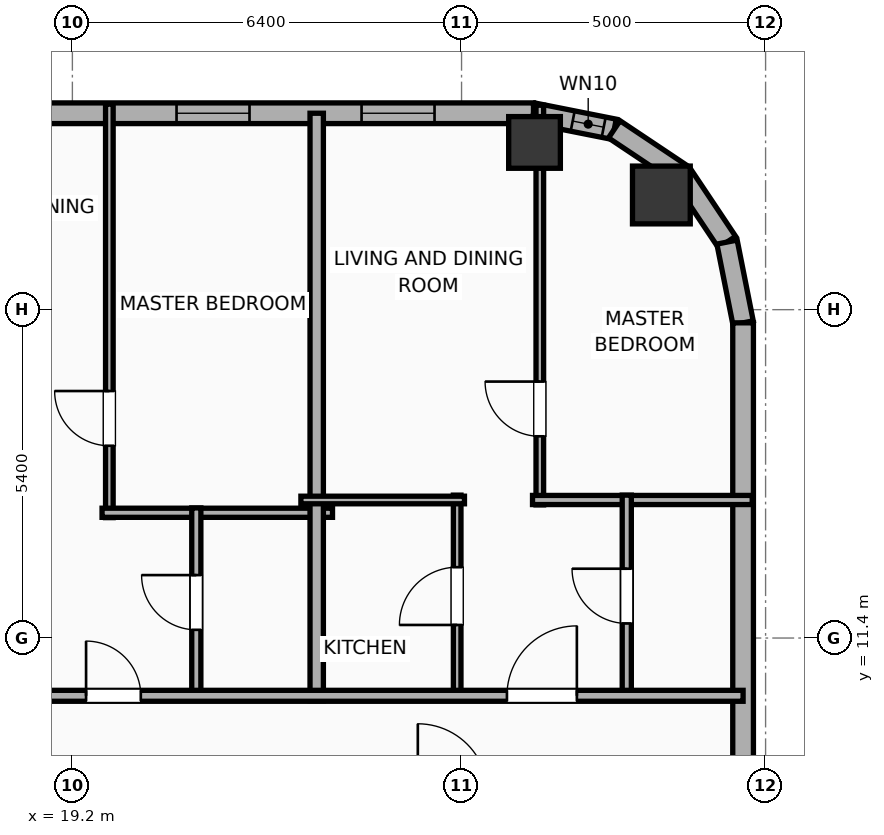
"""IFC4 building model, lengths in metres.
Left out: names, types, materials, properties, quantities, classifications, styles, units other than length and angle.
Written with IfcOpenShell. Run it as: python <this file> out.ifc"""

import sys

from ifc_helpers import new_model, si_unit, direction, frame, frame_2d, origin, origin_2d, place, context, subcontext, project, spatial, rectangle, hollow_rectangle, hollow_circle, extrude, element, fill, save


model = new_model("IFC4")
c1 = context("Model", 3, precision=1e-05, world=origin(), true_north=direction((0.0, 1.0)))
c2 = subcontext(c1, "Body", "Model", "MODEL_VIEW")
j1 = project(units=[si_unit("LENGTHUNIT", "METRE"), si_unit("PLANEANGLEUNIT", "RADIAN")], contexts=[c1])
p1 = place(None, origin())
s1 = spatial("IfcSite", under=j1, at=p1, CompositionType="ELEMENT")
p2 = place(p1, origin())
s2 = spatial("IfcBuilding", under=s1, at=p2, CompositionType="ELEMENT")
p3 = place(p2, frame((0.0, 0.0, 239.2)))
s3 = spatial("IfcBuildingStorey", under=s2, at=p3, CompositionType="ELEMENT", Elevation=239.2)
p4 = place(p3, frame((28.886, 18.686, 0.0), z_axis=(0.0, 0.0, 1.0), x_axis=(1.0, 0.0, 0.0)))
e1 = element("IfcColumn", 1, at=p4, inside=s3, PredefinedType="COLUMN", context=c2, shape_type="SweptSolid", body=[
    extrude(hollow_circle(Radius=0.475, WallThickness=0.032, at=origin_2d()), origin(), (0.0, 0.0, 1.0), 3.9),
])
p5 = place(p3, frame((26.8, 19.55, 0.0), z_axis=(0.0, 0.0, 1.0), x_axis=(1.0, 0.0, 0.0)))
e2 = element("IfcColumn", 2, at=p5, inside=s3, PredefinedType="COLUMN", context=c2, shape_type="SweptSolid", body=[
    extrude(hollow_rectangle(XDim=0.85, YDim=0.85, WallThickness=0.028, at=origin_2d()), origin(), (0.0, 0.0, 1.0), 3.9),
])
p6 = place(p3, frame((-22.783, 20.03, 0.0), z_axis=(0.0, 0.0, 1.0), x_axis=(1.0, 0.0, 0.0)))
e3 = element("IfcWall", 3, at=p6, inside=s3, PredefinedType="ELEMENTEDWALL", context=c2, shape_type="SweptSolid", body=[
    extrude(rectangle(XDim=49.566, YDim=0.34, at=frame_2d((24.783, 0.0))), origin(), (0.0, 0.0, 1.0), 3.65),
])
p7 = place(p6, frame((6.211, 0.0, 0.75)))
e4 = element("IfcOpeningElement", 4, at=p7, cuts=e3, PredefinedType="OPENING", context=c2, shape_type="SweptSolid", body=[
    extrude(rectangle(XDim=2.4, YDim=2.1, at=frame_2d((1.2, 1.05))), frame((0.0, 0.18, 0.0), z_axis=(0.0, -1.0, 0.0), x_axis=(1.0, 0.0, 0.0)), (0.0, 0.0, 1.0), 0.36),
])
p8 = place(p6, frame((22.733, 0.0, 0.75)))
e5 = element("IfcOpeningElement", 5, at=p8, cuts=e3, PredefinedType="OPENING", context=c2, shape_type="SweptSolid", body=[
    extrude(rectangle(XDim=2.4, YDim=2.1, at=frame_2d((1.2, 1.05))), frame((0.0, 0.18, 0.0), z_axis=(0.0, -1.0, 0.0), x_axis=(1.0, 0.0, 0.0)), (0.0, 0.0, 1.0), 0.36),
])
p9 = place(p6, frame((1.132, 0.0, 0.75)))
e6 = element("IfcOpeningElement", 6, at=p9, cuts=e3, PredefinedType="OPENING", context=c2, shape_type="SweptSolid", body=[
    extrude(rectangle(XDim=1.2, YDim=2.05, at=frame_2d((0.6, 1.025))), frame((0.0, 0.18, 0.0), z_axis=(0.0, -1.0, 0.0), x_axis=(1.0, 0.0, 0.0)), (0.0, 0.0, 1.0), 0.36),
])
p10 = place(p6, frame((3.678, 0.0, 0.75)))
e7 = element("IfcOpeningElement", 7, at=p10, cuts=e3, PredefinedType="OPENING", context=c2, shape_type="SweptSolid", body=[
    extrude(rectangle(XDim=1.2, YDim=2.05, at=frame_2d((0.6, 1.025))), frame((0.0, 0.18, 0.0), z_axis=(0.0, -1.0, 0.0), x_axis=(1.0, 0.0, 0.0)), (0.0, 0.0, 1.0), 0.36),
])
p11 = place(p6, frame((14.804, 0.0, 0.75)))
e8 = element("IfcOpeningElement", 8, at=p11, cuts=e3, PredefinedType="OPENING", context=c2, shape_type="SweptSolid", body=[
    extrude(rectangle(XDim=1.2, YDim=2.05, at=frame_2d((0.6, 1.025))), frame((0.0, 0.18, 0.0), z_axis=(0.0, -1.0, 0.0), x_axis=(1.0, 0.0, 0.0)), (0.0, 0.0, 1.0), 0.36),
])
p12 = place(p6, frame((12.054, 0.0, 0.75)))
e9 = element("IfcOpeningElement", 9, at=p12, cuts=e3, PredefinedType="OPENING", context=c2, shape_type="SweptSolid", body=[
    extrude(rectangle(XDim=1.2, YDim=2.05, at=frame_2d((0.6, 1.025))), frame((0.0, 0.18, 0.0), z_axis=(0.0, -1.0, 0.0), x_axis=(1.0, 0.0, 0.0)), (0.0, 0.0, 1.0), 0.36),
])
p13 = place(p6, frame((17.933, 0.0, 0.75)))
e10 = element("IfcOpeningElement", 10, at=p13, cuts=e3, PredefinedType="OPENING", context=c2, shape_type="SweptSolid", body=[
    extrude(rectangle(XDim=1.2, YDim=2.05, at=frame_2d((0.6, 1.025))), frame((0.0, 0.18, 0.0), z_axis=(0.0, -1.0, 0.0), x_axis=(1.0, 0.0, 0.0)), (0.0, 0.0, 1.0), 0.36),
])
p14 = place(p6, frame((26.278, 0.0, 0.75)))
e11 = element("IfcOpeningElement", 11, at=p14, cuts=e3, PredefinedType="OPENING", context=c2, shape_type="SweptSolid", body=[
    extrude(rectangle(XDim=1.2, YDim=2.05, at=frame_2d((0.6, 1.025))), frame((0.0, 0.18, 0.0), z_axis=(0.0, -1.0, 0.0), x_axis=(1.0, 0.0, 0.0)), (0.0, 0.0, 1.0), 0.36),
])
p15 = place(p6, frame((32.677, 0.0, 0.75)))
e12 = element("IfcOpeningElement", 12, at=p15, cuts=e3, PredefinedType="OPENING", context=c2, shape_type="SweptSolid", body=[
    extrude(rectangle(XDim=1.2, YDim=2.05, at=frame_2d((0.6, 1.025))), frame((0.0, 0.18, 0.0), z_axis=(0.0, -1.0, 0.0), x_axis=(1.0, 0.0, 0.0)), (0.0, 0.0, 1.0), 0.36),
])
p16 = place(p6, frame((28.217, 0.0, 0.75)))
e13 = element("IfcOpeningElement", 13, at=p16, cuts=e3, PredefinedType="OPENING", context=c2, shape_type="SweptSolid", body=[
    extrude(rectangle(XDim=0.85, YDim=2.05, at=frame_2d((0.425, 1.025))), frame((0.0, 0.18, 0.0), z_axis=(0.0, -1.0, 0.0), x_axis=(1.0, 0.0, 0.0)), (0.0, 0.0, 1.0), 0.36),
])
p17 = place(p6, frame((36.678, 0.0, 0.75)))
e14 = element("IfcOpeningElement", 14, at=p17, cuts=e3, PredefinedType="OPENING", context=c2, shape_type="SweptSolid", body=[
    extrude(rectangle(XDim=1.2, YDim=2.05, at=frame_2d((0.6, 1.025))), frame((0.0, 0.18, 0.0), z_axis=(0.0, -1.0, 0.0), x_axis=(1.0, 0.0, 0.0)), (0.0, 0.0, 1.0), 0.36),
])
p18 = place(p6, frame((40.307, 0.0, 0.75)))
e15 = element("IfcOpeningElement", 15, at=p18, cuts=e3, PredefinedType="OPENING", context=c2, shape_type="SweptSolid", body=[
    extrude(rectangle(XDim=1.2, YDim=2.05, at=frame_2d((0.6, 1.025))), frame((0.0, 0.18, 0.0), z_axis=(0.0, -1.0, 0.0), x_axis=(1.0, 0.0, 0.0)), (0.0, 0.0, 1.0), 0.36),
])
p19 = place(p6, frame((43.696, 0.0, 0.75)))
e16 = element("IfcOpeningElement", 16, at=p19, cuts=e3, PredefinedType="OPENING", context=c2, shape_type="SweptSolid", body=[
    extrude(rectangle(XDim=1.2, YDim=2.05, at=frame_2d((0.6, 1.025))), frame((0.0, 0.18, 0.0), z_axis=(0.0, -1.0, 0.0), x_axis=(1.0, 0.0, 0.0)), (0.0, 0.0, 1.0), 0.36),
])
p20 = place(p6, frame((46.739, 0.0, 0.75)))
e17 = element("IfcOpeningElement", 17, at=p20, cuts=e3, PredefinedType="OPENING", context=c2, shape_type="SweptSolid", body=[
    extrude(rectangle(XDim=1.2, YDim=2.05, at=frame_2d((0.6, 1.025))), frame((0.0, 0.18, 0.0), z_axis=(0.0, -1.0, 0.0), x_axis=(1.0, 0.0, 0.0)), (0.0, 0.0, 1.0), 0.36),
])
p21 = place(p3, frame((26.783, 20.03, 0.0), z_axis=(0.0, 0.0, 1.0), x_axis=(0.980788153188, -0.195075878998, 0.0)))
e18 = element("IfcWall", 18, at=p21, inside=s3, PredefinedType="ELEMENTEDWALL", context=c2, shape_type="SweptSolid", body=[
    extrude(rectangle(XDim=1.354, YDim=0.34, at=frame_2d((0.677, 0.0))), origin(), (0.0, 0.0, 1.0), 3.65),
])
p22 = place(p21, frame((0.657, 0.0, 0.75)))
e19 = element("IfcOpeningElement", 19, at=p22, cuts=e18, PredefinedType="OPENING", context=c2, shape_type="SweptSolid", body=[
    extrude(rectangle(XDim=0.52, YDim=2.05, at=frame_2d((0.26, 1.025))), frame((0.0, 0.18, 0.0), z_axis=(0.0, -1.0, 0.0), x_axis=(1.0, 0.0, 0.0)), (0.0, 0.0, 1.0), 0.36),
])
for number, where, z_axis, x_axis in (
    (20, (28.111, 19.766, 0.0), (0.0, 0.0, 1.0), (0.831, -0.556, 0.0)),
    (21, (29.223, 19.023, 0.0), (0.0, 0.0, 1.0), (0.556, -0.831, 0.0)),
):
    element("IfcWall", number, at=place(p3, frame(where, z_axis=z_axis, x_axis=x_axis)), inside=s3, PredefinedType="ELEMENTEDWALL", context=c2, shape_type="SweptSolid", body=[
        extrude(rectangle(XDim=1.337, YDim=0.34, at=frame_2d((0.668, 0.0))), origin(), (0.0, 0.0, 1.0), 3.65),
    ])
p23 = place(p3, frame((29.966, 17.911, 0.0), z_axis=(0.0, 0.0, 1.0), x_axis=(0.195075878998, -0.980788153188, 0.0)))
e22 = element("IfcWall", 22, at=p23, inside=s3, PredefinedType="ELEMENTEDWALL", context=c2, shape_type="SweptSolid", body=[
    extrude(rectangle(XDim=1.354, YDim=0.34, at=frame_2d((0.677, 0.0))), origin(), (0.0, 0.0, 1.0), 3.65),
])
p24 = place(p3, frame((30.23, 16.583, 0.0), z_axis=(0.0, 0.0, 1.0), x_axis=(0.0, -1.0, 0.0)))
e23 = element("IfcWall", 23, at=p24, inside=s3, PredefinedType="ELEMENTEDWALL", context=c2, shape_type="SweptSolid", body=[
    extrude(rectangle(XDim=31.967, YDim=0.34, at=frame_2d((15.983, 0.0))), origin(), (0.0, 0.0, 1.0), 3.65),
])
p25 = place(p24, frame((29.924, 0.0, 0.75)))
e24 = element("IfcOpeningElement", 24, at=p25, cuts=e23, PredefinedType="OPENING", context=c2, shape_type="SweptSolid", body=[
    extrude(rectangle(XDim=1.2, YDim=2.05, at=frame_2d((0.6, 1.025))), frame((0.0, 0.18, 0.0), z_axis=(0.0, -1.0, 0.0), x_axis=(1.0, 0.0, 0.0)), (0.0, 0.0, 1.0), 0.36),
])
p26 = place(p24, frame((11.463, 0.0, 0.75)))
e25 = element("IfcOpeningElement", 25, at=p26, cuts=e23, PredefinedType="OPENING", context=c2, shape_type="SweptSolid", body=[
    extrude(rectangle(XDim=1.2, YDim=2.05, at=frame_2d((0.6, 1.025))), frame((0.0, 0.18, 0.0), z_axis=(0.0, -1.0, 0.0), x_axis=(1.0, 0.0, 0.0)), (0.0, 0.0, 1.0), 0.36),
])
p27 = place(p24, frame((20.363, 0.0, 0.75)))
e26 = element("IfcOpeningElement", 26, at=p27, cuts=e23, PredefinedType="OPENING", context=c2, shape_type="SweptSolid", body=[
    extrude(rectangle(XDim=1.2, YDim=2.05, at=frame_2d((0.6, 1.025))), frame((0.0, 0.18, 0.0), z_axis=(0.0, -1.0, 0.0), x_axis=(1.0, 0.0, 0.0)), (0.0, 0.0, 1.0), 0.36),
])
p28 = place(p3, frame((19.808, 13.38, 0.0), z_axis=(0.0, 0.0, 1.0), x_axis=(0.0, 1.0, 0.0)))
e27 = element("IfcWall", 27, at=p28, inside=s3, PredefinedType="PARTITIONING", context=c2, shape_type="SweptSolid", body=[
    extrude(rectangle(XDim=6.8, YDim=0.125, at=frame_2d((3.4, 0.0))), origin(), (0.0, 0.0, 1.0), 3.65),
])
p29 = place(p28, frame((1.182, 0.0, 0.0)))
e28 = element("IfcOpeningElement", 28, at=p29, cuts=e27, PredefinedType="OPENING", context=c2, shape_type="SweptSolid", body=[
    extrude(rectangle(XDim=0.9, YDim=2.05, at=frame_2d((0.45, 1.025))), frame((0.0, 0.073, 0.0), z_axis=(0.0, -1.0, 0.0), x_axis=(1.0, 0.0, 0.0)), (0.0, 0.0, 1.0), 0.145),
])
p30 = place(p3, frame((19.688, 13.46, 0.0), z_axis=(0.0, 0.0, 1.0), x_axis=(1.0, 0.0, 0.0)))
e29 = element("IfcWall", 29, at=p30, inside=s3, PredefinedType="PLUMBINGWALL", context=c2, shape_type="SweptSolid", body=[
    extrude(rectangle(XDim=3.79, YDim=0.15, at=frame_2d((1.895, 0.0))), origin(), (0.0, 0.0, 1.0), 3.65),
])
p31 = place(p3, frame((21.238, 10.43, 0.0), z_axis=(0.0, 0.0, 1.0), x_axis=(0.0, 1.0, 0.0)))
e30 = element("IfcWall", 30, at=p31, inside=s3, PredefinedType="PLUMBINGWALL", context=c2, shape_type="SweptSolid", body=[
    extrude(rectangle(XDim=3.11, YDim=0.15, at=frame_2d((1.555, 0.0))), origin(), (0.0, 0.0, 1.0), 3.65),
])
p32 = place(p31, frame((1.105, 0.0, 0.0)))
e31 = element("IfcOpeningElement", 31, at=p32, cuts=e30, PredefinedType="OPENING", context=c2, shape_type="SweptSolid", body=[
    extrude(rectangle(XDim=0.9, YDim=2.05, at=frame_2d((0.45, 1.025))), frame((0.0, 0.085, 0.0), z_axis=(0.0, -1.0, 0.0), x_axis=(1.0, 0.0, 0.0)), (0.0, 0.0, 1.0), 0.17),
])
p33 = place(p3, frame((23.218, 10.37, 0.0), z_axis=(0.0, 0.0, 1.0), x_axis=(0.0, 1.0, 0.0)))
e32 = element("IfcWall", 32, at=p33, inside=s3, PredefinedType="PARTITIONING", context=c2, shape_type="SweptSolid", body=[
    extrude(rectangle(XDim=9.66, YDim=0.22, at=frame_2d((4.83, 0.0))), origin(), (0.0, 0.0, 1.0), 3.65),
])
p34 = place(p3, frame((26.887, 13.59, 0.0), z_axis=(0.0, 0.0, 1.0), x_axis=(0.0, 1.0, 0.0)))
e33 = element("IfcWall", 33, at=p34, inside=s3, PredefinedType="PARTITIONING", context=c2, shape_type="SweptSolid", body=[
    extrude(rectangle(XDim=6.572, YDim=0.125, at=frame_2d((3.286, 0.0))), origin(), (0.0, 0.0, 1.0), 3.65),
])
p35 = place(p34, frame((1.127, 0.0, 0.0)))
e34 = element("IfcOpeningElement", 34, at=p35, cuts=e33, PredefinedType="OPENING", context=c2, shape_type="SweptSolid", body=[
    extrude(rectangle(XDim=0.9, YDim=2.05, at=frame_2d((0.45, 1.025))), frame((0.0, 0.073, 0.0), z_axis=(0.0, -1.0, 0.0), x_axis=(1.0, 0.0, 0.0)), (0.0, 0.0, 1.0), 0.145),
])
p36 = place(p3, frame((26.767, 13.67, 0.0), z_axis=(0.0, 0.0, 1.0), x_axis=(1.0, 0.0, 0.0)))
e35 = element("IfcWall", 35, at=p36, inside=s3, PredefinedType="PLUMBINGWALL", context=c2, shape_type="SweptSolid", body=[
    extrude(rectangle(XDim=3.613, YDim=0.15, at=frame_2d((1.806, 0.0))), origin(), (0.0, 0.0, 1.0), 3.65),
])
p37 = place(p3, frame((25.528, 10.43, 0.0), z_axis=(0.0, 0.0, 1.0), x_axis=(0.0, 1.0, 0.0)))
e36 = element("IfcWall", 36, at=p37, inside=s3, PredefinedType="PARTITIONING", context=c2, shape_type="SweptSolid", body=[
    extrude(rectangle(XDim=3.32, YDim=0.125, at=frame_2d((1.66, 0.0))), origin(), (0.0, 0.0, 1.0), 3.65),
])
p38 = place(p37, frame((1.185, 0.0, 0.0)))
e37 = element("IfcOpeningElement", 37, at=p38, cuts=e36, PredefinedType="OPENING", context=c2, shape_type="SweptSolid", body=[
    extrude(rectangle(XDim=0.95, YDim=2.05, at=frame_2d((0.475, 1.025))), frame((0.0, 0.073, 0.0), z_axis=(0.0, -1.0, 0.0), x_axis=(1.0, 0.0, 0.0)), (0.0, 0.0, 1.0), 0.145),
])
p39 = place(p3, frame((22.958, 13.67, 0.0), z_axis=(0.0, 0.0, 1.0), x_axis=(1.0, 0.0, 0.0)))
e38 = element("IfcWall", 38, at=p39, inside=s3, PredefinedType="PARTITIONING", context=c2, shape_type="SweptSolid", body=[
    extrude(rectangle(XDim=2.69, YDim=0.125, at=frame_2d((1.345, 0.0))), origin(), (0.0, 0.0, 1.0), 3.65),
])
p40 = place(p3, frame((28.317, 10.43, 0.0), z_axis=(0.0, 0.0, 1.0), x_axis=(0.0, 1.0, 0.0)))
e39 = element("IfcWall", 39, at=p40, inside=s3, PredefinedType="PLUMBINGWALL", context=c2, shape_type="SweptSolid", body=[
    extrude(rectangle(XDim=3.32, YDim=0.15, at=frame_2d((1.66, 0.0))), origin(), (0.0, 0.0, 1.0), 3.65),
])
p41 = place(p40, frame((1.21, 0.0, 0.0)))
e40 = element("IfcOpeningElement", 40, at=p41, cuts=e39, PredefinedType="OPENING", context=c2, shape_type="SweptSolid", body=[
    extrude(rectangle(XDim=0.9, YDim=2.05, at=frame_2d((0.45, 1.025))), frame((0.0, 0.085, 0.0), z_axis=(0.0, -1.0, 0.0), x_axis=(1.0, 0.0, 0.0)), (0.0, 0.0, 1.0), 0.17),
])
p42 = place(p3, frame((-26.23, 10.45, 0.0), z_axis=(0.0, 0.0, 1.0), x_axis=(1.0, 0.0, 0.0)))
e41 = element("IfcWall", 41, at=p42, inside=s3, PredefinedType="PARTITIONING", context=c2, shape_type="SweptSolid", body=[
    extrude(rectangle(XDim=56.46, YDim=0.18, at=frame_2d((28.23, 0.0))), origin(), (0.0, 0.0, 1.0), 3.65),
])
p43 = place(p42, frame((4.41, 0.0, 0.0)))
e42 = element("IfcOpeningElement", 42, at=p43, cuts=e41, PredefinedType="OPENING", context=c2, shape_type="SweptSolid", body=[
    extrude(rectangle(XDim=1.15, YDim=2.05, at=frame_2d((0.575, 1.025))), frame((0.0, 0.1, 0.0), z_axis=(0.0, -1.0, 0.0), x_axis=(1.0, 0.0, 0.0)), (0.0, 0.0, 1.0), 0.2),
])
p44 = place(p42, frame((11.943, 0.0, 0.0)))
e43 = element("IfcOpeningElement", 43, at=p44, cuts=e41, PredefinedType="OPENING", context=c2, shape_type="SweptSolid", body=[
    extrude(rectangle(XDim=0.9, YDim=2.05, at=frame_2d((0.45, 1.025))), frame((0.0, 0.1, 0.0), z_axis=(0.0, -1.0, 0.0), x_axis=(1.0, 0.0, 0.0)), (0.0, 0.0, 1.0), 0.2),
])
p45 = place(p42, frame((18.243, 0.0, 0.0)))
e44 = element("IfcOpeningElement", 44, at=p45, cuts=e41, PredefinedType="OPENING", context=c2, shape_type="SweptSolid", body=[
    extrude(rectangle(XDim=1.15, YDim=2.05, at=frame_2d((0.575, 1.025))), frame((0.0, 0.1, 0.0), z_axis=(0.0, -1.0, 0.0), x_axis=(1.0, 0.0, 0.0)), (0.0, 0.0, 1.0), 0.2),
])
p46 = place(p42, frame((22.941, 0.0, 0.0)))
e45 = element("IfcOpeningElement", 45, at=p46, cuts=e41, PredefinedType="OPENING", context=c2, shape_type="SweptSolid", body=[
    extrude(rectangle(XDim=0.9, YDim=2.05, at=frame_2d((0.45, 1.025))), frame((0.0, 0.1, 0.0), z_axis=(0.0, -1.0, 0.0), x_axis=(1.0, 0.0, 0.0)), (0.0, 0.0, 1.0), 0.2),
])
p47 = place(p42, frame((27.028, 0.0, 0.0)))
e46 = element("IfcOpeningElement", 46, at=p47, cuts=e41, PredefinedType="OPENING", context=c2, shape_type="SweptSolid", body=[
    extrude(rectangle(XDim=1.15, YDim=2.05, at=frame_2d((0.575, 1.025))), frame((0.0, 0.1, 0.0), z_axis=(0.0, -1.0, 0.0), x_axis=(1.0, 0.0, 0.0)), (0.0, 0.0, 1.0), 0.2),
])
p48 = place(p42, frame((36.864, 0.0, 0.0)))
e47 = element("IfcOpeningElement", 47, at=p48, cuts=e41, PredefinedType="OPENING", context=c2, shape_type="SweptSolid", body=[
    extrude(rectangle(XDim=1.15, YDim=2.05, at=frame_2d((0.575, 1.025))), frame((0.0, 0.1, 0.0), z_axis=(0.0, -1.0, 0.0), x_axis=(1.0, 0.0, 0.0)), (0.0, 0.0, 1.0), 0.2),
])
p49 = place(p42, frame((45.655, 0.0, 0.0)))
e48 = element("IfcOpeningElement", 48, at=p49, cuts=e41, PredefinedType="OPENING", context=c2, shape_type="SweptSolid", body=[
    extrude(rectangle(XDim=0.9, YDim=2.05, at=frame_2d((0.45, 1.025))), frame((0.0, 0.1, 0.0), z_axis=(0.0, -1.0, 0.0), x_axis=(1.0, 0.0, 0.0)), (0.0, 0.0, 1.0), 0.2),
])
p50 = place(p42, frame((52.576, 0.0, 0.0)))
e49 = element("IfcOpeningElement", 49, at=p50, cuts=e41, PredefinedType="OPENING", context=c2, shape_type="SweptSolid", body=[
    extrude(rectangle(XDim=1.15, YDim=2.05, at=frame_2d((0.575, 1.025))), frame((0.0, 0.1, 0.0), z_axis=(0.0, -1.0, 0.0), x_axis=(1.0, 0.0, 0.0)), (0.0, 0.0, 1.0), 0.2),
])
p51 = place(p19, origin())
e50 = element("IfcWindow", 50, at=p51, inside=s3, PartitioningType="SINGLE_PANEL", PredefinedType="WINDOW", context=c2, shape_type="SweptSolid", body=[
    extrude(rectangle(XDim=1.2, YDim=2.05, at=frame_2d((0.6, 1.025))), frame((0.0, 0.03, 0.0), z_axis=(0.0, -1.0, 0.0), x_axis=(1.0, 0.0, 0.0)), (0.0, 0.0, 1.0), 0.06),
])
fill(e16, e50)
p52 = place(p20, origin())
e51 = element("IfcWindow", 51, at=p52, inside=s3, PartitioningType="SINGLE_PANEL", PredefinedType="WINDOW", context=c2, shape_type="SweptSolid", body=[
    extrude(rectangle(XDim=1.2, YDim=2.05, at=frame_2d((0.6, 1.025))), frame((0.0, 0.03, 0.0), z_axis=(0.0, -1.0, 0.0), x_axis=(1.0, 0.0, 0.0)), (0.0, 0.0, 1.0), 0.06),
])
fill(e17, e51)
p53 = place(p22, origin())
e52 = element("IfcWindow", 52, at=p53, inside=s3, PartitioningType="SINGLE_PANEL", PredefinedType="WINDOW", context=c2, shape_type="SweptSolid", body=[
    extrude(rectangle(XDim=0.52, YDim=2.05, at=frame_2d((0.26, 1.025))), frame((0.0, 0.03, 0.0), z_axis=(0.0, -1.0, 0.0), x_axis=(1.0, 0.0, 0.0)), (0.0, 0.0, 1.0), 0.06),
])
fill(e19, e52)
p54 = place(p29, origin())
e53 = element("IfcDoor", 53, at=p54, inside=s3, OperationType="SINGLE_SWING_RIGHT", PredefinedType="DOOR", context=c2, shape_type="SweptSolid", body=[
    extrude(rectangle(XDim=0.9, YDim=2.05, at=frame_2d((0.45, 1.025))), frame((0.0, 0.025, 0.0), z_axis=(0.0, -1.0, 0.0), x_axis=(1.0, 0.0, 0.0)), (0.0, 0.0, 1.0), 0.05),
])
fill(e28, e53)
p55 = place(p32, origin())
e54 = element("IfcDoor", 54, at=p55, inside=s3, OperationType="SINGLE_SWING_RIGHT", PredefinedType="DOOR", context=c2, shape_type="SweptSolid", body=[
    extrude(rectangle(XDim=0.9, YDim=2.05, at=frame_2d((0.45, 1.025))), frame((0.0, 0.025, 0.0), z_axis=(0.0, -1.0, 0.0), x_axis=(1.0, 0.0, 0.0)), (0.0, 0.0, 1.0), 0.05),
])
fill(e31, e54)
p56 = place(p35, origin())
e55 = element("IfcDoor", 55, at=p56, inside=s3, OperationType="SINGLE_SWING_RIGHT", PredefinedType="DOOR", context=c2, shape_type="SweptSolid", body=[
    extrude(rectangle(XDim=0.9, YDim=2.05, at=frame_2d((0.45, 1.025))), frame((0.0, 0.025, 0.0), z_axis=(0.0, -1.0, 0.0), x_axis=(1.0, 0.0, 0.0)), (0.0, 0.0, 1.0), 0.05),
])
fill(e34, e55)
p57 = place(p38, origin())
e56 = element("IfcDoor", 56, at=p57, inside=s3, OperationType="SINGLE_SWING_LEFT", PredefinedType="DOOR", context=c2, shape_type="SweptSolid", body=[
    extrude(rectangle(XDim=0.95, YDim=2.05, at=frame_2d((0.475, 1.025))), frame((0.0, 0.025, 0.0), z_axis=(0.0, -1.0, 0.0), x_axis=(1.0, 0.0, 0.0)), (0.0, 0.0, 1.0), 0.05),
])
fill(e37, e56)
p58 = place(p41, origin())
e57 = element("IfcDoor", 57, at=p58, inside=s3, OperationType="SINGLE_SWING_RIGHT", PredefinedType="DOOR", context=c2, shape_type="SweptSolid", body=[
    extrude(rectangle(XDim=0.9, YDim=2.05, at=frame_2d((0.45, 1.025))), frame((0.0, 0.025, 0.0), z_axis=(0.0, -1.0, 0.0), x_axis=(1.0, 0.0, 0.0)), (0.0, 0.0, 1.0), 0.05),
])
fill(e40, e57)
p59 = place(p49, origin())
e58 = element("IfcDoor", 58, at=p59, inside=s3, OperationType="SINGLE_SWING_LEFT", PredefinedType="DOOR", context=c2, shape_type="SweptSolid", body=[
    extrude(rectangle(XDim=0.9, YDim=2.05, at=frame_2d((0.45, 1.025))), frame((0.0, 0.025, 0.0), z_axis=(0.0, -1.0, 0.0), x_axis=(1.0, 0.0, 0.0)), (0.0, 0.0, 1.0), 0.05),
])
fill(e48, e58)
p60 = place(p50, origin())
e59 = element("IfcDoor", 59, at=p60, inside=s3, OperationType="SINGLE_SWING_RIGHT", PredefinedType="DOOR", context=c2, shape_type="SweptSolid", body=[
    extrude(rectangle(XDim=1.15, YDim=2.05, at=frame_2d((0.575, 1.025))), frame((0.0, 0.025, 0.0), z_axis=(0.0, -1.0, 0.0), x_axis=(1.0, 0.0, 0.0)), (0.0, 0.0, 1.0), 0.05),
])
fill(e49, e59)
save(model, sys.argv[1])
